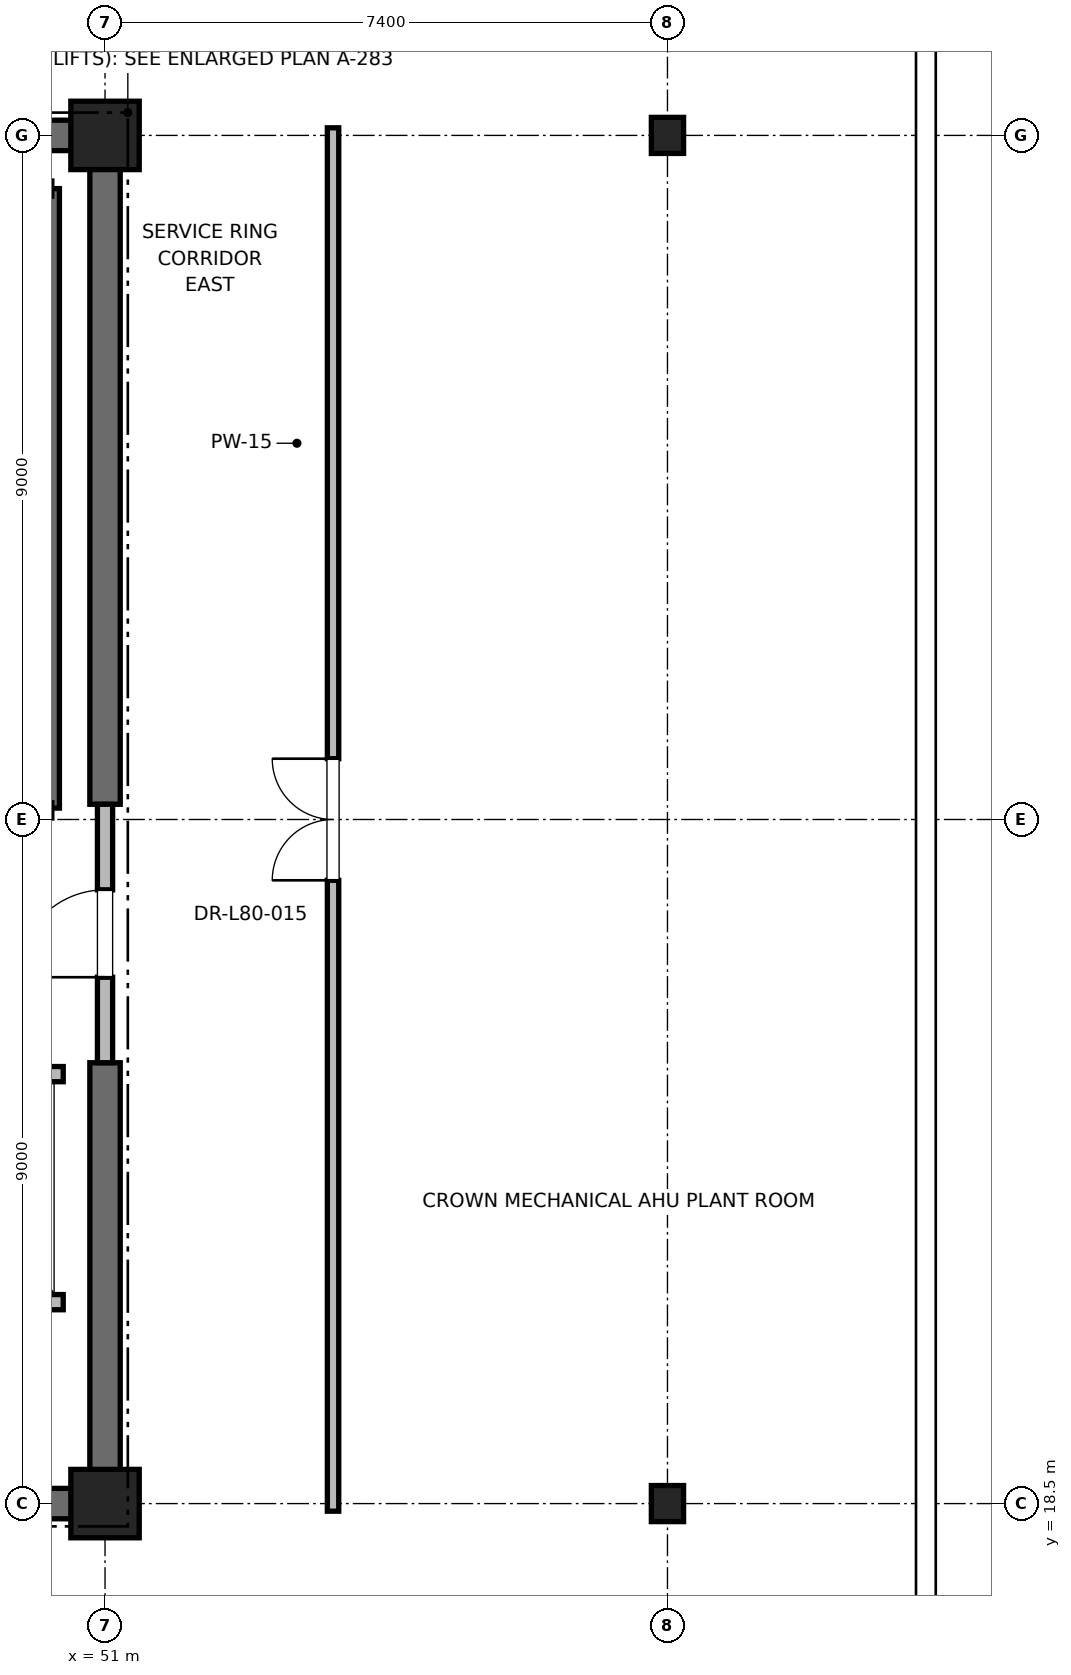
"""IFC4 building model, lengths in metres.
Left out: names, types, materials, properties, quantities, classifications, styles, units other than length and angle.
Written with IfcOpenShell. Run it as: python <this file> out.ifc"""

import sys

from ifc_helpers import new_model, si_unit, direction, frame, frame_2d, origin, origin_2d, place, context, subcontext, project, spatial, rectangle, i_section, extrude, element, fill, save


model = new_model("IFC4")
c1 = context("Model", 3, precision=1e-05, world=origin(), true_north=direction((0.0, 1.0)))
c2 = subcontext(c1, "Body", "Model", "MODEL_VIEW")
j1 = project(units=[si_unit("LENGTHUNIT", "METRE"), si_unit("PLANEANGLEUNIT", "RADIAN")], contexts=[c1])
p1 = place(None, origin())
s1 = spatial("IfcSite", under=j1, at=p1, CompositionType="ELEMENT")
p2 = place(p1, origin())
s2 = spatial("IfcBuilding", under=s1, at=p2, CompositionType="ELEMENT")
p3 = place(p2, frame((0.0, 0.0, 342.8)))
s3 = spatial("IfcBuildingStorey", under=s2, at=p3, CompositionType="ELEMENT", Elevation=342.8)
for number, where, z_axis, x_axis in (
    (1, (58.4, 18.5, 0.0), (0.0, 0.0, 1.0), (1.0, 0.0, 0.0)),
    (2, (58.4, 36.5, 0.0), (0.0, 0.0, 1.0), (1.0, 0.0, 0.0)),
):
    element("IfcColumn", number, at=place(p3, frame(where, z_axis=z_axis, x_axis=x_axis)), inside=s3, PredefinedType="COLUMN", context=c2, shape_type="SweptSolid", body=[
        extrude(i_section(OverallWidth=0.424, OverallDepth=0.475, WebThickness=0.048, FlangeThickness=0.077, FilletRadius=0.015, at=origin_2d()), origin(), (0.0, 0.0, 1.0), 6.0),
    ])
for number, where, z_axis, x_axis in (
    (3, (51.0, 18.5, 0.0), (0.0, 0.0, 1.0), (1.0, 0.0, 0.0)),
    (4, (51.0, 36.5, 0.0), (0.0, 0.0, 1.0), (1.0, 0.0, 0.0)),
):
    element("IfcColumn", number, at=place(p3, frame(where, z_axis=z_axis, x_axis=x_axis)), inside=s3, PredefinedType="PILASTER", context=c2, shape_type="SweptSolid", body=[
        extrude(rectangle(XDim=0.9, YDim=0.9, at=origin_2d()), origin(), (0.0, 0.0, 1.0), 6.0),
    ])
p4 = place(p3, frame((41.8, 18.5, 0.0), z_axis=(0.0, 0.0, 1.0), x_axis=(1.0, 0.0, 0.0)))
e5 = element("IfcWall", 5, at=p4, inside=s3, PredefinedType="SHEAR", context=c2, shape_type="SweptSolid", body=[
    extrude(rectangle(XDim=9.2, YDim=0.4, at=frame_2d((4.6, 0.0))), origin(), (0.0, 0.0, 1.0), 5.7),
])
for number, where, z_axis, x_axis in (
    (6, (45.2, 36.5, 0.0), (0.0, 0.0, 1.0), (1.0, 0.0, 0.0)),
    (7, (51.0, 18.5, 0.0), (0.0, 0.0, 1.0), (0.0, 1.0, 0.0)),
):
    element("IfcWall", number, at=place(p3, frame(where, z_axis=z_axis, x_axis=x_axis)), inside=s3, PredefinedType="SHEAR", context=c2, shape_type="SweptSolid", body=[
        extrude(rectangle(XDim=5.8, YDim=0.4, at=frame_2d((2.9, 0.0))), origin(), (0.0, 0.0, 1.0), 5.7),
    ])
p5 = place(p3, frame((51.0, 27.7, 0.0), z_axis=(0.0, 0.0, 1.0), x_axis=(0.0, 1.0, 0.0)))
e8 = element("IfcWall", 8, at=p5, inside=s3, PredefinedType="SHEAR", context=c2, shape_type="SweptSolid", body=[
    extrude(rectangle(XDim=8.8, YDim=0.4, at=frame_2d((4.4, 0.0))), origin(), (0.0, 0.0, 1.0), 5.7),
])
p6 = place(p3, frame((50.3, 27.65, 0.0), z_axis=(0.0, 0.0, 1.0), x_axis=(0.0, 1.0, 0.0)))
e9 = element("IfcWall", 9, at=p6, inside=s3, PredefinedType="SOLIDWALL", context=c2, shape_type="SweptSolid", body=[
    extrude(rectangle(XDim=8.15, YDim=0.2, at=frame_2d((4.075, 0.0))), origin(), (0.0, 0.0, 1.0), 5.7),
])
p7 = place(p3, frame((51.0, 24.3, 0.0), z_axis=(0.0, 0.0, 1.0), x_axis=(0.0, 1.0, 0.0)))
e10 = element("IfcWall", 10, at=p7, inside=s3, PredefinedType="PARTITIONING", context=c2, shape_type="SweptSolid", body=[
    extrude(rectangle(XDim=3.4, YDim=0.2, at=frame_2d((1.7, 0.0))), origin(), (0.0, 0.0, 1.0), 4.78),
])
p8 = place(p7, frame((1.125, 0.0, 0.0)))
e11 = element("IfcOpeningElement", 11, at=p8, cuts=e10, PredefinedType="OPENING", context=c2, shape_type="SweptSolid", body=[
    extrude(rectangle(XDim=1.15, YDim=2.2, at=frame_2d((0.575, 1.1))), frame((0.0, 0.1, 0.0), z_axis=(0.0, -1.0, 0.0), x_axis=(1.0, 0.0, 0.0)), (0.0, 0.0, 1.0), 0.2),
])
p9 = place(p3, frame((47.85, 21.15, 0.0), z_axis=(0.0, 0.0, 1.0), x_axis=(1.0, 0.0, 0.0)))
e12 = element("IfcWall", 12, at=p9, inside=s3, PredefinedType="SOLIDWALL", context=c2, shape_type="SweptSolid", body=[
    extrude(rectangle(XDim=2.6, YDim=0.2, at=frame_2d((1.3, 0.0))), origin(), (0.0, 0.0, 1.0), 5.7),
])
p10 = place(p3, frame((50.45, 24.15, 0.0), z_axis=(0.0, 0.0, 1.0), x_axis=(-1.0, 0.0, 0.0)))
e13 = element("IfcWall", 13, at=p10, inside=s3, PredefinedType="SOLIDWALL", context=c2, shape_type="SweptSolid", body=[
    extrude(rectangle(XDim=2.6, YDim=0.2, at=frame_2d((1.3, 0.0))), origin(), (0.0, 0.0, 1.0), 4.78),
])
p11 = place(p10, frame((0.75, 0.0, 0.0)))
e14 = element("IfcOpeningElement", 14, at=p11, cuts=e13, PredefinedType="OPENING", context=c2, shape_type="SweptSolid", body=[
    extrude(rectangle(XDim=1.1, YDim=2.2, at=frame_2d((0.55, 1.1))), frame((0.0, 0.1, 0.0), z_axis=(0.0, -1.0, 0.0), x_axis=(1.0, 0.0, 0.0)), (0.0, 0.0, 1.0), 0.2),
])
p12 = place(p3, frame((54.0, 18.4, 0.0), z_axis=(0.0, 0.0, 1.0), x_axis=(0.0, 1.0, 0.0)))
e15 = element("IfcWall", 15, at=p12, inside=s3, PredefinedType="PARTITIONING", context=c2, shape_type="SweptSolid", body=[
    extrude(rectangle(XDim=18.2, YDim=0.15, at=frame_2d((9.1, 0.0))), origin(), (0.0, 0.0, 1.0), 2.85),
])
p13 = place(p12, frame((8.3, 0.0, 0.0)))
e16 = element("IfcOpeningElement", 16, at=p13, cuts=e15, PredefinedType="OPENING", context=c2, shape_type="SweptSolid", body=[
    extrude(rectangle(XDim=1.6, YDim=2.25, at=frame_2d((0.8, 1.125))), frame((0.0, 0.075, 0.0), z_axis=(0.0, -1.0, 0.0), x_axis=(1.0, 0.0, 0.0)), (0.0, 0.0, 1.0), 0.15),
])
p14 = place(p8, origin())
e17 = element("IfcDoor", 17, at=p14, inside=s3, OperationType="SINGLE_SWING_LEFT", PredefinedType="DOOR", context=c2, shape_type="SweptSolid", body=[
    extrude(rectangle(XDim=1.15, YDim=2.2, at=frame_2d((0.575, 1.1))), frame((0.0, 0.025, 0.0), z_axis=(0.0, -1.0, 0.0), x_axis=(1.0, 0.0, 0.0)), (0.0, 0.0, 1.0), 0.05),
])
fill(e11, e17)
p15 = place(p13, origin())
e18 = element("IfcDoor", 18, at=p15, inside=s3, OperationType="DOUBLE_DOOR_SINGLE_SWING", PredefinedType="DOOR", context=c2, shape_type="SweptSolid", body=[
    extrude(rectangle(XDim=1.6, YDim=2.25, at=frame_2d((0.8, 1.125))), frame((0.0, 0.025, 0.0), z_axis=(0.0, -1.0, 0.0), x_axis=(1.0, 0.0, 0.0)), (0.0, 0.0, 1.0), 0.05),
])
fill(e16, e18)
save(model, sys.argv[1])
